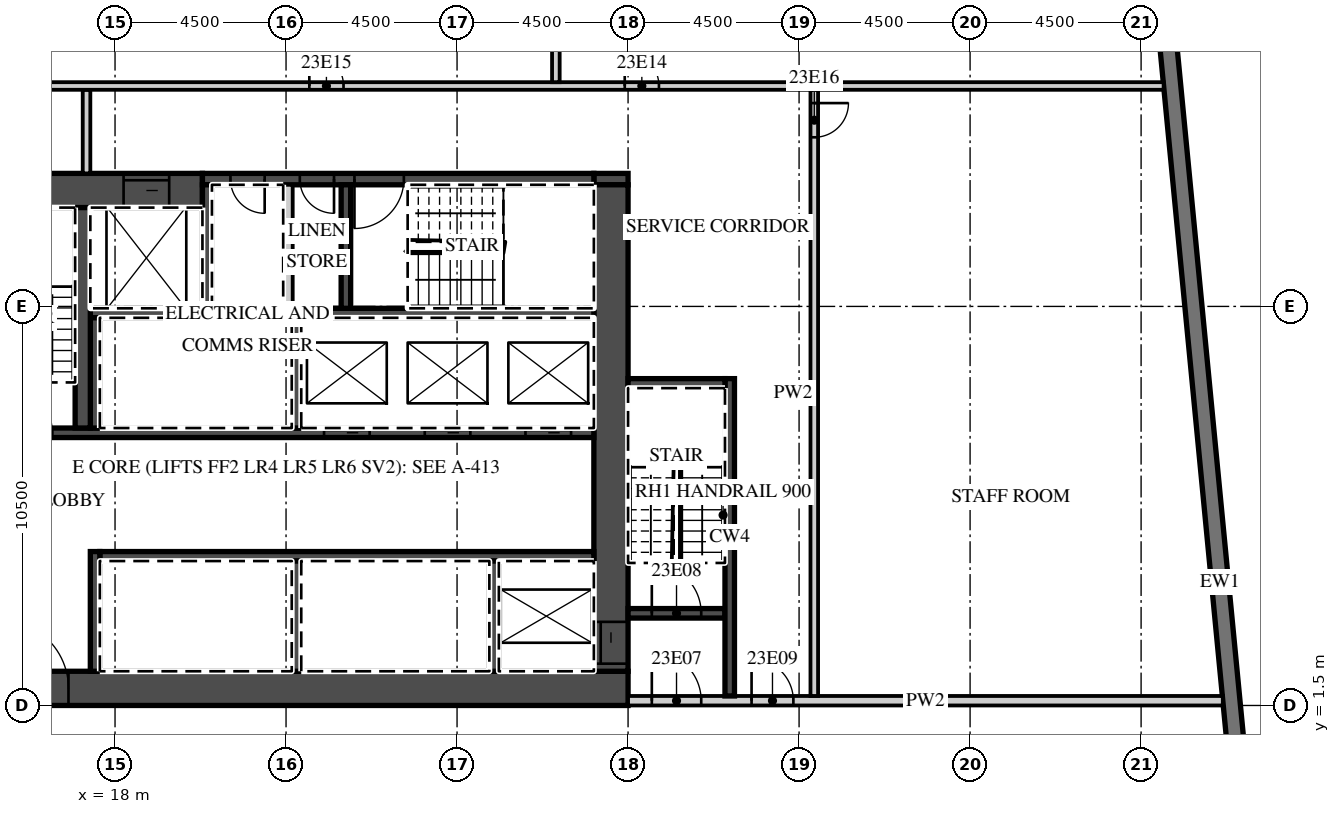
"""IFC4 building model, lengths in metres.
Left out: names, types, materials, properties, quantities, classifications, styles, units other than length and angle.
Written with IfcOpenShell. Run it as: python <this file> out.ifc"""

import sys

from ifc_helpers import new_model, si_unit, direction, frame, frame_2d, origin, place, context, subcontext, project, spatial, rectangle, extrude, element, fill, save


model = new_model("IFC4")
c1 = context("Model", 3, precision=1e-05, world=origin(), true_north=direction((0.0, 1.0)))
c2 = subcontext(c1, "Body", "Model", "MODEL_VIEW")
j1 = project(units=[si_unit("LENGTHUNIT", "METRE"), si_unit("PLANEANGLEUNIT", "RADIAN")], contexts=[c1])
p1 = place(None, origin())
s1 = spatial("IfcSite", under=j1, at=p1, CompositionType="ELEMENT")
p2 = place(p1, origin())
s2 = spatial("IfcBuilding", under=s1, at=p2, CompositionType="ELEMENT")
p3 = place(p2, frame((0.0, 0.0, 110.8)))
s3 = spatial("IfcBuildingStorey", under=s2, at=p3, CompositionType="ELEMENT", Elevation=110.8)
p4 = place(p3, frame((48.753, -12.672, 0.0), z_axis=(0.0, 0.0, 1.0), x_axis=(-0.095842661909, 0.995396495954, 0.0)))
e1 = element("IfcWall", 1, at=p4, inside=s3, PredefinedType="SOLIDWALL", context=c2, shape_type="SweptSolid", body=[
    extrude(rectangle(XDim=35.0, YDim=0.45, at=frame_2d((17.5, 0.0))), origin(), (0.0, 0.0, 1.0), 3.02),
])
p5 = place(p4, frame((3.072, 0.0, 0.45)))
e2 = element("IfcOpeningElement", 2, at=p5, cuts=e1, PredefinedType="OPENING", context=c2, shape_type="SweptSolid", body=[
    extrude(rectangle(XDim=3.3, YDim=2.25, at=frame_2d((1.65, 1.125))), frame((0.0, 0.235, 0.0), z_axis=(0.0, -1.0, 0.0), x_axis=(1.0, 0.0, 0.0)), (0.0, 0.0, 1.0), 0.47),
])
p6 = place(p4, frame((7.593, 0.0, 0.45)))
e3 = element("IfcOpeningElement", 3, at=p6, cuts=e1, PredefinedType="OPENING", context=c2, shape_type="SweptSolid", body=[
    extrude(rectangle(XDim=3.3, YDim=2.25, at=frame_2d((1.65, 1.125))), frame((0.0, 0.235, 0.0), z_axis=(0.0, -1.0, 0.0), x_axis=(1.0, 0.0, 0.0)), (0.0, 0.0, 1.0), 0.47),
])
p7 = place(p3, frame((13.5, 1.95, 0.0), z_axis=(0.0, 0.0, 1.0), x_axis=(1.0, 0.0, 0.0)))
e4 = element("IfcWall", 4, at=p7, inside=s3, PredefinedType="SHEAR", context=c2, shape_type="SweptSolid", body=[
    extrude(rectangle(XDim=18.0, YDim=0.9, at=frame_2d((9.0, 0.0))), origin(), (0.0, 0.0, 1.0), 3.02),
])
p8 = place(p7, frame((1.475, 0.0, 0.0)))
e5 = element("IfcOpeningElement", 5, at=p8, cuts=e4, PredefinedType="OPENING", context=c2, shape_type="SweptSolid", body=[
    extrude(rectangle(XDim=1.8, YDim=2.1, at=frame_2d((0.9, 1.05))), frame((0.0, 0.46, 0.0), z_axis=(0.0, -1.0, 0.0), x_axis=(1.0, 0.0, 0.0)), (0.0, 0.0, 1.0), 0.92),
])
p9 = place(p3, frame((13.5, 15.05, 0.0), z_axis=(0.0, 0.0, 1.0), x_axis=(1.0, 0.0, 0.0)))
e6 = element("IfcWall", 6, at=p9, inside=s3, PredefinedType="SHEAR", context=c2, shape_type="SweptSolid", body=[
    extrude(rectangle(XDim=6.8, YDim=0.9, at=frame_2d((3.4, 0.0))), origin(), (0.0, 0.0, 1.0), 3.02),
])
p10 = place(p9, frame((4.725, 0.0, 0.0)))
e7 = element("IfcOpeningElement", 7, at=p10, cuts=e6, PredefinedType="OPENING", context=c2, shape_type="SweptSolid", body=[
    extrude(rectangle(XDim=1.2, YDim=2.1, at=frame_2d((0.6, 1.05))), frame((0.0, 0.46, 0.0), z_axis=(0.0, -1.0, 0.0), x_axis=(1.0, 0.0, 0.0)), (0.0, 0.0, 1.0), 0.92),
])
p11 = place(p3, frame((30.6, 15.35, 0.0), z_axis=(0.0, 0.0, 1.0), x_axis=(1.0, 0.0, 0.0)))
e8 = element("IfcWall", 8, at=p11, inside=s3, PredefinedType="SHEAR", context=c2, shape_type="SweptSolid", body=[
    extrude(rectangle(XDim=0.9, YDim=0.3, at=frame_2d((0.45, 0.0))), origin(), (0.0, 0.0, 1.0), 3.02),
])
p12 = place(p3, frame((20.3, 15.35, 0.0), z_axis=(0.0, 0.0, 1.0), x_axis=(1.0, 0.0, 0.0)))
e9 = element("IfcWall", 9, at=p12, inside=s3, PredefinedType="SHEAR", context=c2, shape_type="SweptSolid", body=[
    extrude(rectangle(XDim=10.3, YDim=0.3, at=frame_2d((5.15, 0.0))), origin(), (0.0, 0.0, 1.0), 3.02),
])
p13 = place(p12, frame((4.0, 0.0, 0.0)))
e10 = element("IfcOpeningElement", 10, at=p13, cuts=e9, PredefinedType="OPENING", context=c2, shape_type="SweptSolid", body=[
    extrude(rectangle(XDim=1.3, YDim=2.1, at=frame_2d((0.65, 1.05))), frame((0.0, 0.16, 0.0), z_axis=(0.0, -1.0, 0.0), x_axis=(1.0, 0.0, 0.0)), (0.0, 0.0, 1.0), 0.32),
])
p14 = place(p12, frame((2.562, 0.0, 0.0)))
e11 = element("IfcOpeningElement", 11, at=p14, cuts=e9, PredefinedType="OPENING", context=c2, shape_type="SweptSolid", body=[
    extrude(rectangle(XDim=0.9, YDim=2.1, at=frame_2d((0.45, 1.05))), frame((0.0, 0.16, 0.0), z_axis=(0.0, -1.0, 0.0), x_axis=(1.0, 0.0, 0.0)), (0.0, 0.0, 1.0), 0.32),
])
p15 = place(p12, frame((0.738, 0.0, 0.0)))
e12 = element("IfcOpeningElement", 12, at=p15, cuts=e9, PredefinedType="OPENING", context=c2, shape_type="SweptSolid", body=[
    extrude(rectangle(XDim=0.9, YDim=2.1, at=frame_2d((0.45, 1.05))), frame((0.0, 0.16, 0.0), z_axis=(0.0, -1.0, 0.0), x_axis=(1.0, 0.0, 0.0)), (0.0, 0.0, 1.0), 0.32),
])
p16 = place(p3, frame((31.05, 2.4, 0.0), z_axis=(0.0, 0.0, 1.0), x_axis=(0.0, 1.0, 0.0)))
e13 = element("IfcWall", 13, at=p16, inside=s3, PredefinedType="SHEAR", context=c2, shape_type="SweptSolid", body=[
    extrude(rectangle(XDim=12.8, YDim=0.9, at=frame_2d((6.4, 0.0))), origin(), (0.0, 0.0, 1.0), 3.02),
])
p17 = place(p16, frame((0.2, 0.0, 0.0)))
e14 = element("IfcOpeningElement", 14, at=p17, cuts=e13, PredefinedType="OPENING", context=c2, shape_type="SweptSolid", body=[
    extrude(rectangle(XDim=1.1, YDim=2.1, at=frame_2d((0.55, 1.05))), frame((0.0, 0.46, 0.0), z_axis=(0.0, -1.0, 0.0), x_axis=(1.0, 0.0, 0.0)), (0.0, 0.0, 1.0), 0.92),
])
p18 = place(p3, frame((17.6, 5.425, 0.0), z_axis=(0.0, 0.0, 1.0), x_axis=(1.0, 0.0, 0.0)))
e15 = element("IfcWall", 15, at=p18, inside=s3, PredefinedType="SHEAR", context=c2, shape_type="SweptSolid", body=[
    extrude(rectangle(XDim=13.0, YDim=0.25, at=frame_2d((6.5, 0.0))), origin(), (0.0, 0.0, 1.0), 3.02),
])
p19 = place(p3, frame((17.475, 2.4, 0.0), z_axis=(0.0, 0.0, 1.0), x_axis=(0.0, 1.0, 0.0)))
e16 = element("IfcWall", 16, at=p19, inside=s3, PredefinedType="SHEAR", context=c2, shape_type="SweptSolid", body=[
    extrude(rectangle(XDim=3.15, YDim=0.25, at=frame_2d((1.575, 0.0))), origin(), (0.0, 0.0, 1.0), 3.02),
])
for number, where, z_axis, x_axis in (
    (17, (27.975, 2.4, 0.0), (0.0, 0.0, 1.0), (0.0, 1.0, 0.0)),
    (18, (22.775, 2.4, 0.0), (0.0, 0.0, 1.0), (0.0, 1.0, 0.0)),
):
    element("IfcWall", number, at=place(p3, frame(where, z_axis=z_axis, x_axis=x_axis)), inside=s3, PredefinedType="SHEAR", context=c2, shape_type="SweptSolid", body=[
        extrude(rectangle(XDim=2.9, YDim=0.25, at=frame_2d((1.45, 0.0))), origin(), (0.0, 0.0, 1.0), 3.02),
    ])
p20 = place(p3, frame((14.4, 8.675, 0.0), z_axis=(0.0, 0.0, 1.0), x_axis=(1.0, 0.0, 0.0)))
e19 = element("IfcWall", 19, at=p20, inside=s3, PredefinedType="SHEAR", context=c2, shape_type="SweptSolid", body=[
    extrude(rectangle(XDim=16.2, YDim=0.25, at=frame_2d((8.1, 0.0))), origin(), (0.0, 0.0, 1.0), 3.02),
])
p21 = place(p20, frame((14.4, 0.0, 0.0)))
e20 = element("IfcOpeningElement", 20, at=p21, cuts=e19, PredefinedType="OPENING", context=c2, shape_type="SweptSolid", body=[
    extrude(rectangle(XDim=1.2, YDim=2.1, at=frame_2d((0.6, 1.05))), frame((0.0, 0.135, 0.0), z_axis=(0.0, -1.0, 0.0), x_axis=(1.0, 0.0, 0.0)), (0.0, 0.0, 1.0), 0.27),
])
p22 = place(p20, frame((11.75, 0.0, 0.0)))
e21 = element("IfcOpeningElement", 21, at=p22, cuts=e19, PredefinedType="OPENING", context=c2, shape_type="SweptSolid", body=[
    extrude(rectangle(XDim=1.2, YDim=2.1, at=frame_2d((0.6, 1.05))), frame((0.0, 0.135, 0.0), z_axis=(0.0, -1.0, 0.0), x_axis=(1.0, 0.0, 0.0)), (0.0, 0.0, 1.0), 0.27),
])
p23 = place(p20, frame((9.1, 0.0, 0.0)))
e22 = element("IfcOpeningElement", 22, at=p23, cuts=e19, PredefinedType="OPENING", context=c2, shape_type="SweptSolid", body=[
    extrude(rectangle(XDim=1.2, YDim=2.1, at=frame_2d((0.6, 1.05))), frame((0.0, 0.135, 0.0), z_axis=(0.0, -1.0, 0.0), x_axis=(1.0, 0.0, 0.0)), (0.0, 0.0, 1.0), 0.27),
])
p24 = place(p20, frame((0.65, 0.0, 0.0)))
e23 = element("IfcOpeningElement", 23, at=p24, cuts=e19, PredefinedType="OPENING", context=c2, shape_type="SweptSolid", body=[
    extrude(rectangle(XDim=1.3, YDim=2.1, at=frame_2d((0.65, 1.05))), frame((0.0, 0.135, 0.0), z_axis=(0.0, -1.0, 0.0), x_axis=(1.0, 0.0, 0.0)), (0.0, 0.0, 1.0), 0.27),
])
p25 = place(p3, frame((17.35, 11.825, 0.0), z_axis=(0.0, 0.0, 1.0), x_axis=(1.0, 0.0, 0.0)))
e24 = element("IfcWall", 24, at=p25, inside=s3, PredefinedType="SHEAR", context=c2, shape_type="SweptSolid", body=[
    extrude(rectangle(XDim=13.25, YDim=0.25, at=frame_2d((6.625, 0.0))), origin(), (0.0, 0.0, 1.0), 3.02),
])
for number, where, z_axis, x_axis in (
    (25, (17.475, 8.8, 0.0), (0.0, 0.0, 1.0), (0.0, 1.0, 0.0)),
    (26, (22.775, 8.8, 0.0), (0.0, 0.0, 1.0), (0.0, 1.0, 0.0)),
):
    element("IfcWall", number, at=place(p3, frame(where, z_axis=z_axis, x_axis=x_axis)), inside=s3, PredefinedType="SHEAR", context=c2, shape_type="SweptSolid", body=[
        extrude(rectangle(XDim=2.9, YDim=0.25, at=frame_2d((1.45, 0.0))), origin(), (0.0, 0.0, 1.0), 3.02),
    ])
p26 = place(p3, frame((17.15, 8.8, 0.0), z_axis=(0.0, 0.0, 1.0), x_axis=(0.0, 1.0, 0.0)))
e27 = element("IfcWall", 27, at=p26, inside=s3, PredefinedType="SHEAR", context=c2, shape_type="SweptSolid", body=[
    extrude(rectangle(XDim=5.8, YDim=0.4, at=frame_2d((2.9, 0.0))), origin(), (0.0, 0.0, 1.0), 3.02),
])
for number, where, z_axis, x_axis in (
    (28, (20.425, 11.95, 0.0), (0.0, 0.0, 1.0), (0.0, 1.0, 0.0)),
    (29, (24.075, 11.95, 0.0), (0.0, 0.0, 1.0), (0.0, 1.0, 0.0)),
):
    element("IfcWall", number, at=place(p3, frame(where, z_axis=z_axis, x_axis=x_axis)), inside=s3, PredefinedType="SHEAR", context=c2, shape_type="SweptSolid", body=[
        extrude(rectangle(XDim=3.25, YDim=0.25, at=frame_2d((1.625, 0.0))), origin(), (0.0, 0.0, 1.0), 3.02),
    ])
p27 = place(p3, frame((22.55, 11.95, 0.0), z_axis=(0.0, 0.0, 1.0), x_axis=(0.0, 1.0, 0.0)))
e30 = element("IfcWall", 30, at=p27, inside=s3, PredefinedType="PARTITIONING", context=c2, shape_type="SweptSolid", body=[
    extrude(rectangle(XDim=3.25, YDim=0.25, at=frame_2d((1.625, 0.0))), origin(), (0.0, 0.0, 1.0), 3.02),
])
p28 = place(p3, frame((31.5, 1.625, 0.0), z_axis=(0.0, 0.0, 1.0), x_axis=(1.0, 0.0, 0.0)))
e31 = element("IfcWall", 31, at=p28, inside=s3, PredefinedType="PARTITIONING", context=c2, shape_type="SweptSolid", body=[
    extrude(rectangle(XDim=15.65, YDim=0.25, at=frame_2d((7.825, 0.0))), origin(), (0.0, 0.0, 1.0), 3.02),
])
p29 = place(p28, frame((0.625, 0.0, 0.0)))
e32 = element("IfcOpeningElement", 32, at=p29, cuts=e31, PredefinedType="OPENING", context=c2, shape_type="SweptSolid", body=[
    extrude(rectangle(XDim=1.3, YDim=2.1, at=frame_2d((0.65, 1.05))), frame((0.0, 0.135, 0.0), z_axis=(0.0, -1.0, 0.0), x_axis=(1.0, 0.0, 0.0)), (0.0, 0.0, 1.0), 0.27),
])
p30 = place(p28, frame((3.25, 0.0, 0.0)))
e33 = element("IfcOpeningElement", 33, at=p30, cuts=e31, PredefinedType="OPENING", context=c2, shape_type="SweptSolid", body=[
    extrude(rectangle(XDim=1.1, YDim=2.1, at=frame_2d((0.55, 1.05))), frame((0.0, 0.135, 0.0), z_axis=(0.0, -1.0, 0.0), x_axis=(1.0, 0.0, 0.0)), (0.0, 0.0, 1.0), 0.27),
])
p31 = place(p3, frame((31.5, 3.925, 0.0), z_axis=(0.0, 0.0, 1.0), x_axis=(1.0, 0.0, 0.0)))
e34 = element("IfcWall", 34, at=p31, inside=s3, PredefinedType="SHEAR", context=c2, shape_type="SweptSolid", body=[
    extrude(rectangle(XDim=2.55, YDim=0.25, at=frame_2d((1.275, 0.0))), origin(), (0.0, 0.0, 1.0), 3.02),
])
p32 = place(p31, frame((0.625, 0.0, 0.0)))
e35 = element("IfcOpeningElement", 35, at=p32, cuts=e34, PredefinedType="OPENING", context=c2, shape_type="SweptSolid", body=[
    extrude(rectangle(XDim=1.3, YDim=2.1, at=frame_2d((0.65, 1.05))), frame((0.0, 0.135, 0.0), z_axis=(0.0, -1.0, 0.0), x_axis=(1.0, 0.0, 0.0)), (0.0, 0.0, 1.0), 0.27),
])
p33 = place(p3, frame((34.175, 1.75, 0.0), z_axis=(0.0, 0.0, 1.0), x_axis=(0.0, 1.0, 0.0)))
e36 = element("IfcWall", 36, at=p33, inside=s3, PredefinedType="SHEAR", context=c2, shape_type="SweptSolid", body=[
    extrude(rectangle(XDim=8.35, YDim=0.25, at=frame_2d((4.175, 0.0))), origin(), (0.0, 0.0, 1.0), 3.02),
])
p34 = place(p3, frame((31.5, 9.975, 0.0), z_axis=(0.0, 0.0, 1.0), x_axis=(1.0, 0.0, 0.0)))
e37 = element("IfcWall", 37, at=p34, inside=s3, PredefinedType="SHEAR", context=c2, shape_type="SweptSolid", body=[
    extrude(rectangle(XDim=2.55, YDim=0.25, at=frame_2d((1.275, 0.0))), origin(), (0.0, 0.0, 1.0), 3.02),
])
p35 = place(p3, frame((17.25, 15.5, 0.0), z_axis=(0.0, 0.0, 1.0), x_axis=(0.0, 1.0, 0.0)))
e38 = element("IfcWall", 38, at=p35, inside=s3, PredefinedType="PARTITIONING", context=c2, shape_type="SweptSolid", body=[
    extrude(rectangle(XDim=2.2, YDim=0.2, at=frame_2d((1.1, 0.0))), origin(), (0.0, 0.0, 1.0), 3.02),
])
p36 = place(p3, frame((36.4, 1.75, 0.0), z_axis=(0.0, 0.0, 1.0), x_axis=(0.0, 1.0, 0.0)))
e39 = element("IfcWall", 39, at=p36, inside=s3, PredefinedType="PARTITIONING", context=c2, shape_type="SweptSolid", body=[
    extrude(rectangle(XDim=15.95, YDim=0.2, at=frame_2d((7.975, 0.0))), origin(), (0.0, 0.0, 1.0), 3.02),
])
p37 = place(p36, frame((14.7, 0.0, 0.0)))
e40 = element("IfcOpeningElement", 40, at=p37, cuts=e39, PredefinedType="OPENING", context=c2, shape_type="SweptSolid", body=[
    extrude(rectangle(XDim=0.9, YDim=2.1, at=frame_2d((0.45, 1.05))), frame((0.0, 0.11, 0.0), z_axis=(0.0, -1.0, 0.0), x_axis=(1.0, 0.0, 0.0)), (0.0, 0.0, 1.0), 0.22),
])
p38 = place(p3, frame((13.6, 17.8, 0.0), z_axis=(0.0, 0.0, 1.0), x_axis=(1.0, 0.0, 0.0)))
e41 = element("IfcWall", 41, at=p38, inside=s3, PredefinedType="PARTITIONING", context=c2, shape_type="SweptSolid", body=[
    extrude(rectangle(XDim=31.993, YDim=0.2, at=frame_2d((15.997, 0.0))), origin(), (0.0, 0.0, 1.0), 3.02),
])
p39 = place(p38, frame((17.812, 0.0, 0.0)))
e42 = element("IfcOpeningElement", 42, at=p39, cuts=e41, PredefinedType="OPENING", context=c2, shape_type="SweptSolid", body=[
    extrude(rectangle(XDim=0.9, YDim=2.1, at=frame_2d((0.45, 1.05))), frame((0.0, 0.11, 0.0), z_axis=(0.0, -1.0, 0.0), x_axis=(1.0, 0.0, 0.0)), (0.0, 0.0, 1.0), 0.22),
])
p40 = place(p38, frame((9.512, 0.0, 0.0)))
e43 = element("IfcOpeningElement", 43, at=p40, cuts=e41, PredefinedType="OPENING", context=c2, shape_type="SweptSolid", body=[
    extrude(rectangle(XDim=0.9, YDim=2.1, at=frame_2d((0.45, 1.05))), frame((0.0, 0.11, 0.0), z_axis=(0.0, -1.0, 0.0), x_axis=(1.0, 0.0, 0.0)), (0.0, 0.0, 1.0), 0.22),
])
p41 = place(p3, frame((29.6, 17.9, 0.0), z_axis=(0.0, 0.0, 1.0), x_axis=(0.0, 1.0, 0.0)))
e44 = element("IfcWall", 44, at=p41, inside=s3, PredefinedType="PARTITIONING", context=c2, shape_type="SweptSolid", body=[
    extrude(rectangle(XDim=6.313, YDim=0.2, at=frame_2d((3.157, 0.0))), origin(), (0.0, 0.0, 1.0), 3.02),
])
p42 = place(p21, origin())
e45 = element("IfcDoor", 45, at=p42, inside=s3, OperationType="SLIDING_TO_LEFT", PredefinedType="DOOR", context=c2, shape_type="SweptSolid", body=[
    extrude(rectangle(XDim=1.2, YDim=2.1, at=frame_2d((0.6, 1.05))), frame((0.0, 0.025, 0.0), z_axis=(0.0, -1.0, 0.0), x_axis=(1.0, 0.0, 0.0)), (0.0, 0.0, 1.0), 0.05),
])
fill(e20, e45)
p43 = place(p22, origin())
e46 = element("IfcDoor", 46, at=p43, inside=s3, OperationType="SLIDING_TO_RIGHT", PredefinedType="DOOR", context=c2, shape_type="SweptSolid", body=[
    extrude(rectangle(XDim=1.2, YDim=2.1, at=frame_2d((0.6, 1.05))), frame((0.0, 0.025, 0.0), z_axis=(0.0, -1.0, 0.0), x_axis=(1.0, 0.0, 0.0)), (0.0, 0.0, 1.0), 0.05),
])
fill(e21, e46)
p44 = place(p23, origin())
e47 = element("IfcDoor", 47, at=p44, inside=s3, OperationType="SLIDING_TO_RIGHT", PredefinedType="DOOR", context=c2, shape_type="SweptSolid", body=[
    extrude(rectangle(XDim=1.2, YDim=2.1, at=frame_2d((0.6, 1.05))), frame((0.0, 0.025, 0.0), z_axis=(0.0, -1.0, 0.0), x_axis=(1.0, 0.0, 0.0)), (0.0, 0.0, 1.0), 0.05),
])
fill(e22, e47)
p45 = place(p10, origin())
e48 = element("IfcDoor", 48, at=p45, inside=s3, OperationType="SLIDING_TO_LEFT", PredefinedType="DOOR", context=c2, shape_type="SweptSolid", body=[
    extrude(rectangle(XDim=1.2, YDim=2.1, at=frame_2d((0.6, 1.05))), frame((0.0, 0.025, 0.0), z_axis=(0.0, -1.0, 0.0), x_axis=(1.0, 0.0, 0.0)), (0.0, 0.0, 1.0), 0.05),
])
fill(e7, e48)
p46 = place(p17, origin())
e49 = element("IfcDoor", 49, at=p46, inside=s3, OperationType="SLIDING_TO_LEFT", PredefinedType="DOOR", context=c2, shape_type="SweptSolid", body=[
    extrude(rectangle(XDim=1.1, YDim=2.1, at=frame_2d((0.55, 1.05))), frame((0.0, 0.025, 0.0), z_axis=(0.0, -1.0, 0.0), x_axis=(1.0, 0.0, 0.0)), (0.0, 0.0, 1.0), 0.05),
])
fill(e14, e49)
p47 = place(p8, origin())
e50 = element("IfcDoor", 50, at=p47, inside=s3, OperationType="DOUBLE_DOOR_DOUBLE_SWING", PredefinedType="DOOR", context=c2, shape_type="SweptSolid", body=[
    extrude(rectangle(XDim=1.8, YDim=2.1, at=frame_2d((0.9, 1.05))), frame((0.0, 0.025, 0.0), z_axis=(0.0, -1.0, 0.0), x_axis=(1.0, 0.0, 0.0)), (0.0, 0.0, 1.0), 0.05),
])
fill(e5, e50)
p48 = place(p29, origin())
e51 = element("IfcDoor", 51, at=p48, inside=s3, OperationType="SINGLE_SWING_LEFT", PredefinedType="DOOR", context=c2, shape_type="SweptSolid", body=[
    extrude(rectangle(XDim=1.3, YDim=2.1, at=frame_2d((0.65, 1.05))), frame((0.0, 0.025, 0.0), z_axis=(0.0, -1.0, 0.0), x_axis=(1.0, 0.0, 0.0)), (0.0, 0.0, 1.0), 0.05),
])
fill(e32, e51)
p49 = place(p32, origin())
e52 = element("IfcDoor", 52, at=p49, inside=s3, OperationType="SINGLE_SWING_LEFT", PredefinedType="DOOR", context=c2, shape_type="SweptSolid", body=[
    extrude(rectangle(XDim=1.3, YDim=2.1, at=frame_2d((0.65, 1.05))), frame((0.0, 0.025, 0.0), z_axis=(0.0, -1.0, 0.0), x_axis=(1.0, 0.0, 0.0)), (0.0, 0.0, 1.0), 0.05),
])
fill(e35, e52)
p50 = place(p30, origin())
e53 = element("IfcDoor", 53, at=p50, inside=s3, OperationType="SINGLE_SWING_LEFT", PredefinedType="DOOR", context=c2, shape_type="SweptSolid", body=[
    extrude(rectangle(XDim=1.1, YDim=2.1, at=frame_2d((0.55, 1.05))), frame((0.0, 0.025, 0.0), z_axis=(0.0, -1.0, 0.0), x_axis=(1.0, 0.0, 0.0)), (0.0, 0.0, 1.0), 0.05),
])
fill(e33, e53)
p51 = place(p13, origin())
e54 = element("IfcDoor", 54, at=p51, inside=s3, OperationType="SINGLE_SWING_LEFT", PredefinedType="DOOR", context=c2, shape_type="SweptSolid", body=[
    extrude(rectangle(XDim=1.3, YDim=2.1, at=frame_2d((0.65, 1.05))), frame((0.0, 0.025, 0.0), z_axis=(0.0, -1.0, 0.0), x_axis=(1.0, 0.0, 0.0)), (0.0, 0.0, 1.0), 0.05),
])
fill(e10, e54)
p52 = place(p14, origin())
e55 = element("IfcDoor", 55, at=p52, inside=s3, OperationType="SINGLE_SWING_RIGHT", PredefinedType="DOOR", context=c2, shape_type="SweptSolid", body=[
    extrude(rectangle(XDim=0.9, YDim=2.1, at=frame_2d((0.45, 1.05))), frame((0.0, 0.025, 0.0), z_axis=(0.0, -1.0, 0.0), x_axis=(1.0, 0.0, 0.0)), (0.0, 0.0, 1.0), 0.05),
])
fill(e11, e55)
p53 = place(p15, origin())
e56 = element("IfcDoor", 56, at=p53, inside=s3, OperationType="SINGLE_SWING_RIGHT", PredefinedType="DOOR", context=c2, shape_type="SweptSolid", body=[
    extrude(rectangle(XDim=0.9, YDim=2.1, at=frame_2d((0.45, 1.05))), frame((0.0, 0.025, 0.0), z_axis=(0.0, -1.0, 0.0), x_axis=(1.0, 0.0, 0.0)), (0.0, 0.0, 1.0), 0.05),
])
fill(e12, e56)
p54 = place(p39, origin())
e57 = element("IfcDoor", 57, at=p54, inside=s3, OperationType="SINGLE_SWING_LEFT", PredefinedType="DOOR", context=c2, shape_type="SweptSolid", body=[
    extrude(rectangle(XDim=0.9, YDim=2.1, at=frame_2d((0.45, 1.05))), frame((0.0, 0.025, 0.0), z_axis=(0.0, -1.0, 0.0), x_axis=(1.0, 0.0, 0.0)), (0.0, 0.0, 1.0), 0.05),
])
fill(e42, e57)
p55 = place(p40, origin())
e58 = element("IfcDoor", 58, at=p55, inside=s3, OperationType="SINGLE_SWING_LEFT", PredefinedType="DOOR", context=c2, shape_type="SweptSolid", body=[
    extrude(rectangle(XDim=0.9, YDim=2.1, at=frame_2d((0.45, 1.05))), frame((0.0, 0.025, 0.0), z_axis=(0.0, -1.0, 0.0), x_axis=(1.0, 0.0, 0.0)), (0.0, 0.0, 1.0), 0.05),
])
fill(e43, e58)
p56 = place(p37, origin())
e59 = element("IfcDoor", 59, at=p56, inside=s3, OperationType="SINGLE_SWING_RIGHT", PredefinedType="DOOR", context=c2, shape_type="SweptSolid", body=[
    extrude(rectangle(XDim=0.9, YDim=2.1, at=frame_2d((0.45, 1.05))), frame((0.0, 0.025, 0.0), z_axis=(0.0, -1.0, 0.0), x_axis=(1.0, 0.0, 0.0)), (0.0, 0.0, 1.0), 0.05),
])
fill(e40, e59)
save(model, sys.argv[1])
